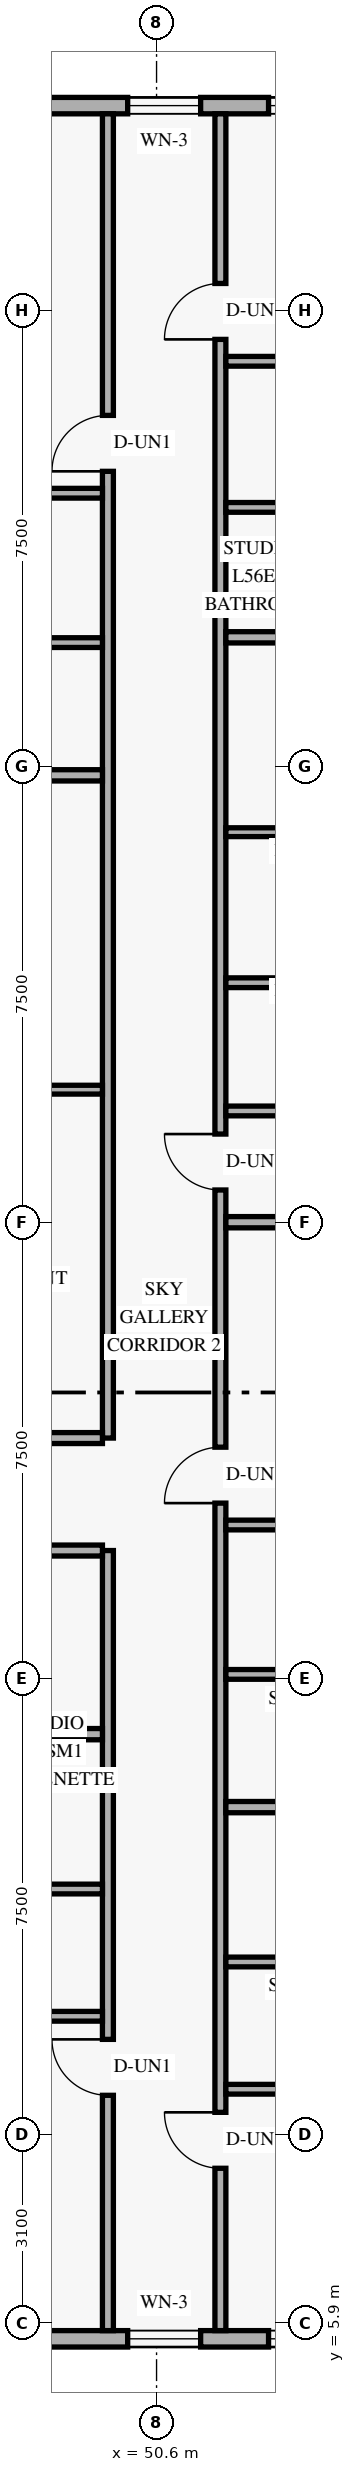
"""IFC4 building model, lengths in metres.
Left out: names, types, materials, properties, quantities, classifications, styles, units other than length and angle.
Written with IfcOpenShell. Run it as: python <this file> out.ifc"""

import sys

from ifc_helpers import new_model, si_unit, direction, frame, frame_2d, origin, place, context, subcontext, project, spatial, rectangle, extrude, element, fill, save


model = new_model("IFC4")
c1 = context("Model", 3, precision=1e-05, world=origin(), true_north=direction((0.0, 1.0)))
c2 = subcontext(c1, "Body", "Model", "MODEL_VIEW")
j1 = project(units=[si_unit("LENGTHUNIT", "METRE"), si_unit("PLANEANGLEUNIT", "RADIAN")], contexts=[c1])
p1 = place(None, origin())
s1 = spatial("IfcSite", under=j1, at=p1, CompositionType="ELEMENT")
p2 = place(p1, origin())
s2 = spatial("IfcBuilding", under=s1, at=p2, CompositionType="ELEMENT")
p3 = place(p2, frame((0.0, 0.0, 216.6)))
s3 = spatial("IfcBuildingStorey", under=s2, at=p3, CompositionType="ELEMENT", Elevation=216.6)
p4 = place(p3, frame((25.82, 5.635, 0.0), z_axis=(0.0, 0.0, 1.0), x_axis=(1.0, 0.0, 0.0)))
e1 = element("IfcWall", 1, at=p4, inside=s3, PredefinedType="SOLIDWALL", context=c2, shape_type="SweptSolid", body=[
    extrude(rectangle(XDim=32.96, YDim=0.27, at=frame_2d((16.48, 0.0))), origin(), (0.0, 0.0, 1.0), 3.36),
])
p5 = place(p4, frame((3.645, 0.0, 0.85)))
e2 = element("IfcOpeningElement", 2, at=p5, cuts=e1, PredefinedType="OPENING", context=c2, shape_type="SweptSolid", body=[
    extrude(rectangle(XDim=1.65, YDim=1.6, at=frame_2d((0.825, 0.8))), frame((0.0, 0.145, 0.0), z_axis=(0.0, -1.0, 0.0), x_axis=(1.0, 0.0, 0.0)), (0.0, 0.0, 1.0), 0.29),
])
p6 = place(p4, frame((18.863, 0.0, 0.85)))
e3 = element("IfcOpeningElement", 3, at=p6, cuts=e1, PredefinedType="OPENING", context=c2, shape_type="SweptSolid", body=[
    extrude(rectangle(XDim=1.65, YDim=1.6, at=frame_2d((0.825, 0.8))), frame((0.0, 0.145, 0.0), z_axis=(0.0, -1.0, 0.0), x_axis=(1.0, 0.0, 0.0)), (0.0, 0.0, 1.0), 0.29),
])
p7 = place(p4, frame((24.305, 0.0, 0.85)))
e4 = element("IfcOpeningElement", 4, at=p7, cuts=e1, PredefinedType="OPENING", context=c2, shape_type="SweptSolid", body=[
    extrude(rectangle(XDim=1.2, YDim=1.5, at=frame_2d((0.6, 0.75))), frame((0.0, 0.145, 0.0), z_axis=(0.0, -1.0, 0.0), x_axis=(1.0, 0.0, 0.0)), (0.0, 0.0, 1.0), 0.29),
])
p8 = place(p4, frame((26.622, 0.0, 0.85)))
e5 = element("IfcOpeningElement", 5, at=p8, cuts=e1, PredefinedType="OPENING", context=c2, shape_type="SweptSolid", body=[
    extrude(rectangle(XDim=1.65, YDim=1.6, at=frame_2d((0.825, 0.8))), frame((0.0, 0.145, 0.0), z_axis=(0.0, -1.0, 0.0), x_axis=(1.0, 0.0, 0.0)), (0.0, 0.0, 1.0), 0.29),
])
p9 = place(p3, frame((58.78, 42.365, 0.0), z_axis=(0.0, 0.0, 1.0), x_axis=(-1.0, 0.0, 0.0)))
e6 = element("IfcWall", 6, at=p9, inside=s3, PredefinedType="SOLIDWALL", context=c2, shape_type="SweptSolid", body=[
    extrude(rectangle(XDim=32.96, YDim=0.27, at=frame_2d((16.48, 0.0))), origin(), (0.0, 0.0, 1.0), 3.36),
])
p10 = place(p9, frame((27.665, 0.0, 0.85)))
e7 = element("IfcOpeningElement", 7, at=p10, cuts=e6, PredefinedType="OPENING", context=c2, shape_type="SweptSolid", body=[
    extrude(rectangle(XDim=1.65, YDim=1.6, at=frame_2d((0.825, 0.8))), frame((0.0, 0.145, 0.0), z_axis=(0.0, -1.0, 0.0), x_axis=(1.0, 0.0, 0.0)), (0.0, 0.0, 1.0), 0.29),
])
p11 = place(p9, frame((15.135, 0.0, 0.85)))
e8 = element("IfcOpeningElement", 8, at=p11, cuts=e6, PredefinedType="OPENING", context=c2, shape_type="SweptSolid", body=[
    extrude(rectangle(XDim=1.65, YDim=1.6, at=frame_2d((0.825, 0.8))), frame((0.0, 0.145, 0.0), z_axis=(0.0, -1.0, 0.0), x_axis=(1.0, 0.0, 0.0)), (0.0, 0.0, 1.0), 0.29),
])
p12 = place(p9, frame((7.455, 0.0, 0.85)))
e9 = element("IfcOpeningElement", 9, at=p12, cuts=e6, PredefinedType="OPENING", context=c2, shape_type="SweptSolid", body=[
    extrude(rectangle(XDim=1.2, YDim=1.5, at=frame_2d((0.6, 0.75))), frame((0.0, 0.145, 0.0), z_axis=(0.0, -1.0, 0.0), x_axis=(1.0, 0.0, 0.0)), (0.0, 0.0, 1.0), 0.29),
])
p13 = place(p9, frame((4.688, 0.0, 0.85)))
e10 = element("IfcOpeningElement", 10, at=p13, cuts=e6, PredefinedType="OPENING", context=c2, shape_type="SweptSolid", body=[
    extrude(rectangle(XDim=1.65, YDim=1.6, at=frame_2d((0.825, 0.8))), frame((0.0, 0.145, 0.0), z_axis=(0.0, -1.0, 0.0), x_axis=(1.0, 0.0, 0.0)), (0.0, 0.0, 1.0), 0.29),
])
p14 = place(p3, frame((49.8, 5.77, 0.0), z_axis=(0.0, 0.0, 1.0), x_axis=(0.0, 1.0, 0.0)))
e11 = element("IfcWall", 11, at=p14, inside=s3, PredefinedType="STANDARD", context=c2, shape_type="SweptSolid", body=[
    extrude(rectangle(XDim=12.83, YDim=0.18, at=frame_2d((6.415, 0.0))), origin(), (0.0, 0.0, 1.0), 2.803),
])
p15 = place(p14, frame((3.87, 0.0, 0.0)))
e12 = element("IfcOpeningElement", 12, at=p15, cuts=e11, PredefinedType="OPENING", context=c2, shape_type="SweptSolid", body=[
    extrude(rectangle(XDim=0.92, YDim=2.15, at=frame_2d((0.46, 1.075))), frame((0.0, 0.1, 0.0), z_axis=(0.0, -1.0, 0.0), x_axis=(1.0, 0.0, 0.0)), (0.0, 0.0, 1.0), 0.2),
])
p16 = place(p3, frame((49.8, 20.45, 0.0), z_axis=(0.0, 0.0, 1.0), x_axis=(0.0, 1.0, 0.0)))
e13 = element("IfcWall", 13, at=p16, inside=s3, PredefinedType="STANDARD", context=c2, shape_type="SweptSolid", body=[
    extrude(rectangle(XDim=21.78, YDim=0.18, at=frame_2d((10.89, 0.0))), origin(), (0.0, 0.0, 1.0), 2.803),
])
p17 = place(p16, frame((15.9, 0.0, 0.0)))
e14 = element("IfcOpeningElement", 14, at=p17, cuts=e13, PredefinedType="OPENING", context=c2, shape_type="SweptSolid", body=[
    extrude(rectangle(XDim=0.92, YDim=2.15, at=frame_2d((0.46, 1.075))), frame((0.0, 0.1, 0.0), z_axis=(0.0, -1.0, 0.0), x_axis=(1.0, 0.0, 0.0)), (0.0, 0.0, 1.0), 0.2),
])
p18 = place(p3, frame((37.64, 18.6, 0.0), z_axis=(0.0, 0.0, 1.0), x_axis=(1.0, 0.0, 0.0)))
e15 = element("IfcWall", 15, at=p18, inside=s3, PredefinedType="STANDARD", context=c2, shape_type="SweptSolid", body=[
    extrude(rectangle(XDim=12.07, YDim=0.18, at=frame_2d((6.035, 0.0))), origin(), (0.0, 0.0, 1.0), 2.803),
])
p19 = place(p3, frame((37.64, 20.45, 0.0), z_axis=(0.0, 0.0, 1.0), x_axis=(1.0, 0.0, 0.0)))
e16 = element("IfcWall", 16, at=p19, inside=s3, PredefinedType="STANDARD", context=c2, shape_type="SweptSolid", body=[
    extrude(rectangle(XDim=12.07, YDim=0.18, at=frame_2d((6.035, 0.0))), origin(), (0.0, 0.0, 1.0), 2.803),
])
p20 = place(p19, frame((0.32, 0.0, 0.0)))
e17 = element("IfcOpeningElement", 17, at=p20, cuts=e16, PredefinedType="OPENING", context=c2, shape_type="SweptSolid", body=[
    extrude(rectangle(XDim=0.92, YDim=2.15, at=frame_2d((0.46, 1.075))), frame((0.0, 0.1, 0.0), z_axis=(0.0, -1.0, 0.0), x_axis=(1.0, 0.0, 0.0)), (0.0, 0.0, 1.0), 0.2),
])
p21 = place(p3, frame((51.65, 5.77, 0.0), z_axis=(0.0, 0.0, 1.0), x_axis=(0.0, 1.0, 0.0)))
e18 = element("IfcWall", 18, at=p21, inside=s3, PredefinedType="STANDARD", context=c2, shape_type="SweptSolid", body=[
    extrude(rectangle(XDim=36.46, YDim=0.18, at=frame_2d((18.23, 0.0))), origin(), (0.0, 0.0, 1.0), 2.803),
])
p22 = place(p21, frame((2.67, 0.0, 0.0)))
e19 = element("IfcOpeningElement", 19, at=p22, cuts=e18, PredefinedType="OPENING", context=c2, shape_type="SweptSolid", body=[
    extrude(rectangle(XDim=0.92, YDim=2.15, at=frame_2d((0.46, 1.075))), frame((0.0, 0.1, 0.0), z_axis=(0.0, -1.0, 0.0), x_axis=(1.0, 0.0, 0.0)), (0.0, 0.0, 1.0), 0.2),
])
p23 = place(p21, frame((13.61, 0.0, 0.0)))
e20 = element("IfcOpeningElement", 20, at=p23, cuts=e18, PredefinedType="OPENING", context=c2, shape_type="SweptSolid", body=[
    extrude(rectangle(XDim=0.92, YDim=2.15, at=frame_2d((0.46, 1.075))), frame((0.0, 0.1, 0.0), z_axis=(0.0, -1.0, 0.0), x_axis=(1.0, 0.0, 0.0)), (0.0, 0.0, 1.0), 0.2),
])
p24 = place(p21, frame((18.76, 0.0, 0.0)))
e21 = element("IfcOpeningElement", 21, at=p24, cuts=e18, PredefinedType="OPENING", context=c2, shape_type="SweptSolid", body=[
    extrude(rectangle(XDim=0.92, YDim=2.15, at=frame_2d((0.46, 1.075))), frame((0.0, 0.1, 0.0), z_axis=(0.0, -1.0, 0.0), x_axis=(1.0, 0.0, 0.0)), (0.0, 0.0, 1.0), 0.2),
])
p25 = place(p21, frame((32.75, 0.0, 0.0)))
e22 = element("IfcOpeningElement", 22, at=p25, cuts=e18, PredefinedType="OPENING", context=c2, shape_type="SweptSolid", body=[
    extrude(rectangle(XDim=0.92, YDim=2.15, at=frame_2d((0.46, 1.075))), frame((0.0, 0.1, 0.0), z_axis=(0.0, -1.0, 0.0), x_axis=(1.0, 0.0, 0.0)), (0.0, 0.0, 1.0), 0.2),
])
p26 = place(p3, frame((51.74, 9.74, 0.0), z_axis=(0.0, 0.0, 1.0), x_axis=(1.0, 0.0, 0.0)))
e23 = element("IfcWall", 23, at=p26, inside=s3, PredefinedType="PLUMBINGWALL", context=c2, shape_type="SweptSolid", body=[
    extrude(rectangle(XDim=5.53, YDim=0.16, at=frame_2d((2.765, 0.0))), origin(), (0.0, 0.0, 1.0), 2.879),
])
p27 = place(p3, frame((51.74, 11.833, 0.0), z_axis=(0.0, 0.0, 1.0), x_axis=(1.0, 0.0, 0.0)))
e24 = element("IfcWall", 24, at=p27, inside=s3, PredefinedType="PLUMBINGWALL", context=c2, shape_type="SweptSolid", body=[
    extrude(rectangle(XDim=5.37, YDim=0.16, at=frame_2d((2.685, 0.0))), origin(), (0.0, 0.0, 1.0), 2.879),
])
p28 = place(p3, frame((51.74, 14.38, 0.0), z_axis=(0.0, 0.0, 1.0), x_axis=(1.0, 0.0, 0.0)))
e25 = element("IfcWall", 25, at=p28, inside=s3, PredefinedType="PARTITIONING", context=c2, shape_type="SweptSolid", body=[
    extrude(rectangle(XDim=10.39, YDim=0.185, at=frame_2d((5.195, 0.0))), origin(), (0.0, 0.0, 1.0), 2.879),
])
p29 = place(p3, frame((51.74, 19.02, 0.0), z_axis=(0.0, 0.0, 1.0), x_axis=(1.0, 0.0, 0.0)))
e26 = element("IfcWall", 26, at=p29, inside=s3, PredefinedType="PLUMBINGWALL", context=c2, shape_type="SweptSolid", body=[
    extrude(rectangle(XDim=5.53, YDim=0.16, at=frame_2d((2.765, 0.0))), origin(), (0.0, 0.0, 1.0), 2.879),
])
p30 = place(p3, frame((51.74, 16.563, 0.0), z_axis=(0.0, 0.0, 1.0), x_axis=(1.0, 0.0, 0.0)))
e27 = element("IfcWall", 27, at=p30, inside=s3, PredefinedType="PLUMBINGWALL", context=c2, shape_type="SweptSolid", body=[
    extrude(rectangle(XDim=5.37, YDim=0.16, at=frame_2d((2.685, 0.0))), origin(), (0.0, 0.0, 1.0), 2.879),
])
p31 = place(p3, frame((51.74, 24.0, 0.0), z_axis=(0.0, 0.0, 1.0), x_axis=(1.0, 0.0, 0.0)))
e28 = element("IfcWall", 28, at=p31, inside=s3, PredefinedType="PARTITIONING", context=c2, shape_type="SweptSolid", body=[
    extrude(rectangle(XDim=10.39, YDim=0.185, at=frame_2d((5.195, 0.0))), origin(), (0.0, 0.0, 1.0), 2.879),
])
p32 = place(p3, frame((51.74, 30.415, 0.0), z_axis=(0.0, 0.0, 1.0), x_axis=(1.0, 0.0, 0.0)))
e29 = element("IfcWall", 29, at=p32, inside=s3, PredefinedType="PARTITIONING", context=c2, shape_type="SweptSolid", body=[
    extrude(rectangle(XDim=10.39, YDim=0.145, at=frame_2d((5.195, 0.0))), origin(), (0.0, 0.0, 1.0), 2.879),
])
p33 = place(p32, frame((5.69, 0.0, 0.0)))
e30 = element("IfcOpeningElement", 30, at=p33, cuts=e29, PredefinedType="OPENING", context=c2, shape_type="SweptSolid", body=[
    extrude(rectangle(XDim=0.88, YDim=2.12, at=frame_2d((0.44, 1.06))), frame((0.0, 0.083, 0.0), z_axis=(0.0, -1.0, 0.0), x_axis=(1.0, 0.0, 0.0)), (0.0, 0.0, 1.0), 0.165),
])
p34 = place(p32, frame((8.265, 0.0, 0.0)))
e31 = element("IfcOpeningElement", 31, at=p34, cuts=e29, PredefinedType="OPENING", context=c2, shape_type="SweptSolid", body=[
    extrude(rectangle(XDim=0.9, YDim=2.14, at=frame_2d((0.45, 1.07))), frame((0.0, 0.083, 0.0), z_axis=(0.0, -1.0, 0.0), x_axis=(1.0, 0.0, 0.0)), (0.0, 0.0, 1.0), 0.165),
])
p35 = place(p3, frame((51.74, 25.83, 0.0), z_axis=(0.0, 0.0, 1.0), x_axis=(1.0, 0.0, 0.0)))
e32 = element("IfcWall", 32, at=p35, inside=s3, PredefinedType="PLUMBINGWALL", context=c2, shape_type="SweptSolid", body=[
    extrude(rectangle(XDim=5.53, YDim=0.16, at=frame_2d((2.765, 0.0))), origin(), (0.0, 0.0, 1.0), 2.879),
])
p36 = place(p3, frame((51.74, 27.939, 0.0), z_axis=(0.0, 0.0, 1.0), x_axis=(1.0, 0.0, 0.0)))
e33 = element("IfcWall", 33, at=p36, inside=s3, PredefinedType="PLUMBINGWALL", context=c2, shape_type="SweptSolid", body=[
    extrude(rectangle(XDim=5.37, YDim=0.16, at=frame_2d((2.685, 0.0))), origin(), (0.0, 0.0, 1.0), 2.879),
])
p37 = place(p3, frame((51.74, 33.62, 0.0), z_axis=(0.0, 0.0, 1.0), x_axis=(1.0, 0.0, 0.0)))
e34 = element("IfcWall", 34, at=p37, inside=s3, PredefinedType="PARTITIONING", context=c2, shape_type="SweptSolid", body=[
    extrude(rectangle(XDim=10.39, YDim=0.185, at=frame_2d((5.195, 0.0))), origin(), (0.0, 0.0, 1.0), 2.879),
])
p38 = place(p3, frame((51.74, 38.16, 0.0), z_axis=(0.0, 0.0, 1.0), x_axis=(1.0, 0.0, 0.0)))
e35 = element("IfcWall", 35, at=p38, inside=s3, PredefinedType="PLUMBINGWALL", context=c2, shape_type="SweptSolid", body=[
    extrude(rectangle(XDim=2.834, YDim=0.16, at=frame_2d((1.417, 0.0))), origin(), (0.0, 0.0, 1.0), 3.36),
])
p39 = place(p3, frame((51.74, 35.757, 0.0), z_axis=(0.0, 0.0, 1.0), x_axis=(1.0, 0.0, 0.0)))
e36 = element("IfcWall", 36, at=p39, inside=s3, PredefinedType="PLUMBINGWALL", context=c2, shape_type="SweptSolid", body=[
    extrude(rectangle(XDim=2.674, YDim=0.16, at=frame_2d((1.337, 0.0))), origin(), (0.0, 0.0, 1.0), 3.36),
])
p40 = place(p3, frame((38.022, 15.58, 0.0), z_axis=(0.0, 0.0, 1.0), x_axis=(1.0, 0.0, 0.0)))
e37 = element("IfcWall", 37, at=p40, inside=s3, PredefinedType="PARTITIONING", context=c2, shape_type="SweptSolid", body=[
    extrude(rectangle(XDim=11.688, YDim=0.185, at=frame_2d((5.844, 0.0))), origin(), (0.0, 0.0, 1.0), 2.803),
])
p41 = place(p3, frame((47.18, 10.94, 0.0), z_axis=(0.0, 0.0, 1.0), x_axis=(1.0, 0.0, 0.0)))
e38 = element("IfcWall", 38, at=p41, inside=s3, PredefinedType="PLUMBINGWALL", context=c2, shape_type="SweptSolid", body=[
    extrude(rectangle(XDim=2.53, YDim=0.16, at=frame_2d((1.265, 0.0))), origin(), (0.0, 0.0, 1.0), 2.803),
])
p42 = place(p3, frame((47.34, 13.033, 0.0), z_axis=(0.0, 0.0, 1.0), x_axis=(1.0, 0.0, 0.0)))
e39 = element("IfcWall", 39, at=p42, inside=s3, PredefinedType="PLUMBINGWALL", context=c2, shape_type="SweptSolid", body=[
    extrude(rectangle(XDim=2.37, YDim=0.16, at=frame_2d((1.185, 0.0))), origin(), (0.0, 0.0, 1.0), 2.803),
])
p43 = place(p3, frame((38.573, 31.35, 0.0), z_axis=(0.0, 0.0, 1.0), x_axis=(1.0, 0.0, 0.0)))
e40 = element("IfcWall", 40, at=p43, inside=s3, PredefinedType="PARTITIONING", context=c2, shape_type="SweptSolid", body=[
    extrude(rectangle(XDim=11.137, YDim=0.185, at=frame_2d((5.569, 0.0))), origin(), (0.0, 0.0, 1.0), 2.803),
])
p44 = place(p3, frame((45.74, 26.18, 0.0), z_axis=(0.0, 0.0, 1.0), x_axis=(1.0, 0.0, 0.0)))
e41 = element("IfcWall", 41, at=p44, inside=s3, PredefinedType="PARTITIONING", context=c2, shape_type="SweptSolid", body=[
    extrude(rectangle(XDim=3.97, YDim=0.145, at=frame_2d((1.985, 0.0))), origin(), (0.0, 0.0, 1.0), 2.803),
])
p45 = place(p3, frame((47.104, 35.99, 0.0), z_axis=(0.0, 0.0, 1.0), x_axis=(1.0, 0.0, 0.0)))
e42 = element("IfcWall", 42, at=p45, inside=s3, PredefinedType="PLUMBINGWALL", context=c2, shape_type="SweptSolid", body=[
    extrude(rectangle(XDim=2.606, YDim=0.16, at=frame_2d((1.303, 0.0))), origin(), (0.0, 0.0, 1.0), 2.803),
])
p46 = place(p3, frame((47.264, 33.533, 0.0), z_axis=(0.0, 0.0, 1.0), x_axis=(1.0, 0.0, 0.0)))
e43 = element("IfcWall", 43, at=p46, inside=s3, PredefinedType="PLUMBINGWALL", context=c2, shape_type="SweptSolid", body=[
    extrude(rectangle(XDim=2.446, YDim=0.16, at=frame_2d((1.223, 0.0))), origin(), (0.0, 0.0, 1.0), 2.803),
])
p47 = place(p7, origin())
e44 = element("IfcWindow", 44, at=p47, inside=s3, PartitioningType="SINGLE_PANEL", PredefinedType="WINDOW", context=c2, shape_type="SweptSolid", body=[
    extrude(rectangle(XDim=1.2, YDim=1.5, at=frame_2d((0.6, 0.75))), frame((0.0, 0.03, 0.0), z_axis=(0.0, -1.0, 0.0), x_axis=(1.0, 0.0, 0.0)), (0.0, 0.0, 1.0), 0.06),
])
fill(e4, e44)
p48 = place(p8, origin())
e45 = element("IfcWindow", 45, at=p48, inside=s3, PartitioningType="SINGLE_PANEL", PredefinedType="WINDOW", context=c2, shape_type="SweptSolid", body=[
    extrude(rectangle(XDim=1.65, YDim=1.6, at=frame_2d((0.825, 0.8))), frame((0.0, 0.03, 0.0), z_axis=(0.0, -1.0, 0.0), x_axis=(1.0, 0.0, 0.0)), (0.0, 0.0, 1.0), 0.06),
])
fill(e5, e45)
p49 = place(p12, origin())
e46 = element("IfcWindow", 46, at=p49, inside=s3, PartitioningType="SINGLE_PANEL", PredefinedType="WINDOW", context=c2, shape_type="SweptSolid", body=[
    extrude(rectangle(XDim=1.2, YDim=1.5, at=frame_2d((0.6, 0.75))), frame((0.0, 0.03, 0.0), z_axis=(0.0, -1.0, 0.0), x_axis=(1.0, 0.0, 0.0)), (0.0, 0.0, 1.0), 0.06),
])
fill(e9, e46)
p50 = place(p13, origin())
e47 = element("IfcWindow", 47, at=p50, inside=s3, PartitioningType="SINGLE_PANEL", PredefinedType="WINDOW", context=c2, shape_type="SweptSolid", body=[
    extrude(rectangle(XDim=1.65, YDim=1.6, at=frame_2d((0.825, 0.8))), frame((0.0, 0.03, 0.0), z_axis=(0.0, -1.0, 0.0), x_axis=(1.0, 0.0, 0.0)), (0.0, 0.0, 1.0), 0.06),
])
fill(e10, e47)
p51 = place(p22, origin())
e48 = element("IfcDoor", 48, at=p51, inside=s3, OperationType="SINGLE_SWING_RIGHT", PredefinedType="DOOR", context=c2, shape_type="SweptSolid", body=[
    extrude(rectangle(XDim=0.92, YDim=2.15, at=frame_2d((0.46, 1.075))), frame((0.0, 0.025, 0.0), z_axis=(0.0, -1.0, 0.0), x_axis=(1.0, 0.0, 0.0)), (0.0, 0.0, 1.0), 0.05),
])
fill(e19, e48)
p52 = place(p23, origin())
e49 = element("IfcDoor", 49, at=p52, inside=s3, OperationType="SINGLE_SWING_LEFT", PredefinedType="DOOR", context=c2, shape_type="SweptSolid", body=[
    extrude(rectangle(XDim=0.92, YDim=2.15, at=frame_2d((0.46, 1.075))), frame((0.0, 0.025, 0.0), z_axis=(0.0, -1.0, 0.0), x_axis=(1.0, 0.0, 0.0)), (0.0, 0.0, 1.0), 0.05),
])
fill(e20, e49)
p53 = place(p24, origin())
e50 = element("IfcDoor", 50, at=p53, inside=s3, OperationType="SINGLE_SWING_RIGHT", PredefinedType="DOOR", context=c2, shape_type="SweptSolid", body=[
    extrude(rectangle(XDim=0.92, YDim=2.15, at=frame_2d((0.46, 1.075))), frame((0.0, 0.025, 0.0), z_axis=(0.0, -1.0, 0.0), x_axis=(1.0, 0.0, 0.0)), (0.0, 0.0, 1.0), 0.05),
])
fill(e21, e50)
p54 = place(p25, origin())
e51 = element("IfcDoor", 51, at=p54, inside=s3, OperationType="SINGLE_SWING_LEFT", PredefinedType="DOOR", context=c2, shape_type="SweptSolid", body=[
    extrude(rectangle(XDim=0.92, YDim=2.15, at=frame_2d((0.46, 1.075))), frame((0.0, 0.025, 0.0), z_axis=(0.0, -1.0, 0.0), x_axis=(1.0, 0.0, 0.0)), (0.0, 0.0, 1.0), 0.05),
])
fill(e22, e51)
p55 = place(p15, origin())
e52 = element("IfcDoor", 52, at=p55, inside=s3, OperationType="SINGLE_SWING_RIGHT", PredefinedType="DOOR", context=c2, shape_type="SweptSolid", body=[
    extrude(rectangle(XDim=0.92, YDim=2.15, at=frame_2d((0.46, 1.075))), frame((0.0, 0.025, 0.0), z_axis=(0.0, -1.0, 0.0), x_axis=(1.0, 0.0, 0.0)), (0.0, 0.0, 1.0), 0.05),
])
fill(e12, e52)
p56 = place(p17, origin())
e53 = element("IfcDoor", 53, at=p56, inside=s3, OperationType="SINGLE_SWING_LEFT", PredefinedType="DOOR", context=c2, shape_type="SweptSolid", body=[
    extrude(rectangle(XDim=0.92, YDim=2.15, at=frame_2d((0.46, 1.075))), frame((0.0, 0.025, 0.0), z_axis=(0.0, -1.0, 0.0), x_axis=(1.0, 0.0, 0.0)), (0.0, 0.0, 1.0), 0.05),
])
fill(e14, e53)
save(model, sys.argv[1])
